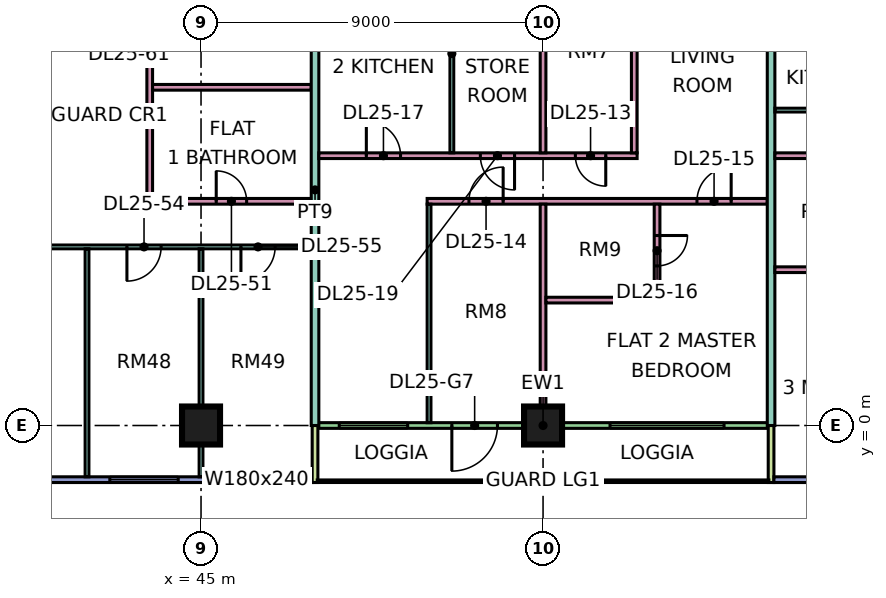
"""IFC4 building model, lengths in metres.
Left out: names, types, materials, properties, quantities, classifications, styles, units other than length and angle.
Written with IfcOpenShell. Run it as: python <this file> out.ifc"""

import sys

from ifc_helpers import new_model, si_unit, direction, frame, frame_2d, origin, origin_2d, place, context, subcontext, project, spatial, rectangle, extrude, element, fill, save


model = new_model("IFC4")
c1 = context("Model", 3, precision=1e-05, world=origin(), true_north=direction((0.0, 1.0)))
c2 = subcontext(c1, "Body", "Model", "MODEL_VIEW")
j1 = project(units=[si_unit("LENGTHUNIT", "METRE"), si_unit("PLANEANGLEUNIT", "RADIAN")], contexts=[c1])
p1 = place(None, origin())
s1 = spatial("IfcSite", under=j1, at=p1, CompositionType="ELEMENT")
p2 = place(p1, origin())
s2 = spatial("IfcBuilding", under=s1, at=p2, CompositionType="ELEMENT")
p3 = place(p2, frame((0.0, 0.0, 110.65)))
s3 = spatial("IfcBuildingStorey", under=s2, at=p3, CompositionType="ELEMENT", Elevation=110.65)
for number, where, z_axis, x_axis in (
    (1, (45.0, 0.0, 0.0), (0.0, 0.0, 1.0), (1.0, 0.0, 0.0)),
    (2, (54.0, 0.0, 0.0), (0.0, 0.0, 1.0), (1.0, 0.0, 0.0)),
):
    element("IfcColumn", number, at=place(p3, frame(where, z_axis=z_axis, x_axis=x_axis)), inside=s3, PredefinedType="COLUMN", context=c2, shape_type="SweptSolid", body=[
        extrude(rectangle(XDim=1.0, YDim=1.0, at=origin_2d()), origin(), (0.0, 0.0, 1.0), 3.75),
    ])
p4 = place(p3, frame((36.075, -1.425, 0.0), z_axis=(0.0, 0.0, 1.0), x_axis=(1.0, 0.0, 0.0)))
e3 = element("IfcWall", 3, at=p4, inside=s3, PredefinedType="SOLIDWALL", context=c2, shape_type="SweptSolid", body=[
    extrude(rectangle(XDim=11.85, YDim=0.15, at=frame_2d((5.925, 0.0))), origin(), (0.0, 0.0, 1.0), 3.35),
])
p5 = place(p4, frame((1.462, 0.0, 0.45)))
e4 = element("IfcOpeningElement", 4, at=p5, cuts=e3, PredefinedType="OPENING", context=c2, shape_type="SweptSolid", body=[
    extrude(rectangle(XDim=3.0, YDim=2.4, at=frame_2d((1.5, 1.2))), frame((0.0, 0.085, 0.0), z_axis=(0.0, -1.0, 0.0), x_axis=(1.0, 0.0, 0.0)), (0.0, 0.0, 1.0), 0.17),
])
p6 = place(p4, frame((6.525, 0.0, 0.45)))
e5 = element("IfcOpeningElement", 5, at=p6, cuts=e3, PredefinedType="OPENING", context=c2, shape_type="SweptSolid", body=[
    extrude(rectangle(XDim=1.8, YDim=2.4, at=frame_2d((0.9, 1.2))), frame((0.0, 0.085, 0.0), z_axis=(0.0, -1.0, 0.0), x_axis=(1.0, 0.0, 0.0)), (0.0, 0.0, 1.0), 0.17),
])
p7 = place(p4, frame((9.488, 0.0, 0.45)))
e6 = element("IfcOpeningElement", 6, at=p7, cuts=e3, PredefinedType="OPENING", context=c2, shape_type="SweptSolid", body=[
    extrude(rectangle(XDim=1.8, YDim=2.4, at=frame_2d((0.9, 1.2))), frame((0.0, 0.085, 0.0), z_axis=(0.0, -1.0, 0.0), x_axis=(1.0, 0.0, 0.0)), (0.0, 0.0, 1.0), 0.17),
])
p8 = place(p3, frame((48.075, 0.0, 0.0), z_axis=(0.0, 0.0, 1.0), x_axis=(1.0, 0.0, 0.0)))
e7 = element("IfcWall", 7, at=p8, inside=s3, PredefinedType="SOLIDWALL", context=c2, shape_type="SweptSolid", body=[
    extrude(rectangle(XDim=11.85, YDim=0.15, at=frame_2d((5.925, 0.0))), origin(), (0.0, 0.0, 1.0), 3.35),
])
p9 = place(p8, frame((0.562, 0.0, 0.45)))
e8 = element("IfcOpeningElement", 8, at=p9, cuts=e7, PredefinedType="OPENING", context=c2, shape_type="SweptSolid", body=[
    extrude(rectangle(XDim=1.8, YDim=2.4, at=frame_2d((0.9, 1.2))), frame((0.0, 0.085, 0.0), z_axis=(0.0, -1.0, 0.0), x_axis=(1.0, 0.0, 0.0)), (0.0, 0.0, 1.0), 0.17),
])
p10 = place(p8, frame((3.525, 0.0, 0.0)))
e9 = element("IfcOpeningElement", 9, at=p10, cuts=e7, PredefinedType="OPENING", context=c2, shape_type="SweptSolid", body=[
    extrude(rectangle(XDim=1.2, YDim=2.4, at=frame_2d((0.6, 1.2))), frame((0.0, 0.085, 0.0), z_axis=(0.0, -1.0, 0.0), x_axis=(1.0, 0.0, 0.0)), (0.0, 0.0, 1.0), 0.17),
])
p11 = place(p8, frame((7.688, 0.0, 0.45)))
e10 = element("IfcOpeningElement", 10, at=p11, cuts=e7, PredefinedType="OPENING", context=c2, shape_type="SweptSolid", body=[
    extrude(rectangle(XDim=3.0, YDim=2.4, at=frame_2d((1.5, 1.2))), frame((0.0, 0.085, 0.0), z_axis=(0.0, -1.0, 0.0), x_axis=(1.0, 0.0, 0.0)), (0.0, 0.0, 1.0), 0.17),
])
for number, where, z_axis, x_axis in (
    (11, (48.0, -1.5, 0.0), (0.0, 0.0, 1.0), (0.0, 1.0, 0.0)),
    (12, (60.0, -1.5, 0.0), (0.0, 0.0, 1.0), (0.0, 1.0, 0.0)),
):
    element("IfcWall", number, at=place(p3, frame(where, z_axis=z_axis, x_axis=x_axis)), inside=s3, PredefinedType="SOLIDWALL", context=c2, shape_type="SweptSolid", body=[
        extrude(rectangle(XDim=1.5, YDim=0.15, at=frame_2d((0.75, 0.0))), origin(), (0.0, 0.0, 1.0), 3.35),
    ])
p12 = place(p3, frame((60.075, -1.425, 0.0), z_axis=(0.0, 0.0, 1.0), x_axis=(1.0, 0.0, 0.0)))
e13 = element("IfcWall", 13, at=p12, inside=s3, PredefinedType="SOLIDWALL", context=c2, shape_type="SweptSolid", body=[
    extrude(rectangle(XDim=10.425, YDim=0.15, at=frame_2d((5.212, 0.0))), origin(), (0.0, 0.0, 1.0), 3.35),
])
p13 = place(p12, frame((1.462, 0.0, 0.45)))
e14 = element("IfcOpeningElement", 14, at=p13, cuts=e13, PredefinedType="OPENING", context=c2, shape_type="SweptSolid", body=[
    extrude(rectangle(XDim=3.0, YDim=2.4, at=frame_2d((1.5, 1.2))), frame((0.0, 0.085, 0.0), z_axis=(0.0, -1.0, 0.0), x_axis=(1.0, 0.0, 0.0)), (0.0, 0.0, 1.0), 0.17),
])
p14 = place(p12, frame((6.675, 0.0, 0.45)))
e15 = element("IfcOpeningElement", 15, at=p14, cuts=e13, PredefinedType="OPENING", context=c2, shape_type="SweptSolid", body=[
    extrude(rectangle(XDim=3.0, YDim=2.4, at=frame_2d((1.5, 1.2))), frame((0.0, 0.085, 0.0), z_axis=(0.0, -1.0, 0.0), x_axis=(1.0, 0.0, 0.0)), (0.0, 0.0, 1.0), 0.17),
])
p15 = place(p3, frame((33.05, 4.7, 0.0), z_axis=(0.0, 0.0, 1.0), x_axis=(1.0, 0.0, 0.0)))
e16 = element("IfcWall", 16, at=p15, inside=s3, PredefinedType="PARTITIONING", context=c2, shape_type="SweptSolid", body=[
    extrude(rectangle(XDim=14.85, YDim=0.1, at=frame_2d((7.425, 0.0))), origin(), (0.0, 0.0, 1.0), 3.35),
])
p16 = place(p15, frame((10.0, 0.0, 0.0)))
e17 = element("IfcOpeningElement", 17, at=p16, cuts=e16, PredefinedType="OPENING", context=c2, shape_type="SweptSolid", body=[
    extrude(rectangle(XDim=0.9, YDim=2.1, at=frame_2d((0.45, 1.05))), frame((0.0, 0.06, 0.0), z_axis=(0.0, -1.0, 0.0), x_axis=(1.0, 0.0, 0.0)), (0.0, 0.0, 1.0), 0.12),
])
p17 = place(p15, frame((13.0, 0.0, 0.0)))
e18 = element("IfcOpeningElement", 18, at=p17, cuts=e16, PredefinedType="OPENING", context=c2, shape_type="SweptSolid", body=[
    extrude(rectangle(XDim=0.9, YDim=2.1, at=frame_2d((0.45, 1.05))), frame((0.0, 0.06, 0.0), z_axis=(0.0, -1.0, 0.0), x_axis=(1.0, 0.0, 0.0)), (0.0, 0.0, 1.0), 0.12),
])
p18 = place(p15, frame((4.0, 0.0, 0.0)))
e19 = element("IfcOpeningElement", 19, at=p18, cuts=e16, PredefinedType="OPENING", context=c2, shape_type="SweptSolid", body=[
    extrude(rectangle(XDim=0.9, YDim=2.1, at=frame_2d((0.45, 1.05))), frame((0.0, 0.06, 0.0), z_axis=(0.0, -1.0, 0.0), x_axis=(1.0, 0.0, 0.0)), (0.0, 0.0, 1.0), 0.12),
])
p19 = place(p3, frame((42.0, -1.35, 0.0), z_axis=(0.0, 0.0, 1.0), x_axis=(0.0, 1.0, 0.0)))
e20 = element("IfcWall", 20, at=p19, inside=s3, PredefinedType="PARTITIONING", context=c2, shape_type="SweptSolid", body=[
    extrude(rectangle(XDim=6.0, YDim=0.1, at=frame_2d((3.0, 0.0))), origin(), (0.0, 0.0, 1.0), 3.35),
])
p20 = place(p3, frame((43.65, 5.825, 0.0), z_axis=(0.0, 0.0, 1.0), x_axis=(0.0, 1.0, 0.0)))
e21 = element("IfcWall", 21, at=p20, inside=s3, PredefinedType="PARTITIONING", context=c2, shape_type="SweptSolid", body=[
    extrude(rectangle(XDim=6.575, YDim=0.15, at=frame_2d((3.288, 0.0))), origin(), (0.0, 0.0, 1.0), 3.35),
])
p21 = place(p20, frame((4.425, 0.0, 0.0)))
e22 = element("IfcOpeningElement", 22, at=p21, cuts=e21, PredefinedType="OPENING", context=c2, shape_type="SweptSolid", body=[
    extrude(rectangle(XDim=0.9, YDim=2.1, at=frame_2d((0.45, 1.05))), frame((0.0, 0.085, 0.0), z_axis=(0.0, -1.0, 0.0), x_axis=(1.0, 0.0, 0.0)), (0.0, 0.0, 1.0), 0.17),
])
p22 = place(p3, frame((43.725, 5.9, 0.0), z_axis=(0.0, 0.0, 1.0), x_axis=(1.0, 0.0, 0.0)))
e23 = element("IfcWall", 23, at=p22, inside=s3, PredefinedType="PARTITIONING", context=c2, shape_type="SweptSolid", body=[
    extrude(rectangle(XDim=4.175, YDim=0.15, at=frame_2d((2.087, 0.0))), origin(), (0.0, 0.0, 1.0), 3.35),
])
p23 = place(p22, frame((1.675, 0.0, 0.0)))
e24 = element("IfcOpeningElement", 24, at=p23, cuts=e23, PredefinedType="OPENING", context=c2, shape_type="SweptSolid", body=[
    extrude(rectangle(XDim=0.8, YDim=2.1, at=frame_2d((0.4, 1.05))), frame((0.0, 0.085, 0.0), z_axis=(0.0, -1.0, 0.0), x_axis=(1.0, 0.0, 0.0)), (0.0, 0.0, 1.0), 0.17),
])
p24 = place(p3, frame((43.725, 8.9, 0.0), z_axis=(0.0, 0.0, 1.0), x_axis=(1.0, 0.0, 0.0)))
e25 = element("IfcWall", 25, at=p24, inside=s3, PredefinedType="PARTITIONING", context=c2, shape_type="SweptSolid", body=[
    extrude(rectangle(XDim=4.175, YDim=0.15, at=frame_2d((2.087, 0.0))), origin(), (0.0, 0.0, 1.0), 3.35),
])
p25 = place(p3, frame((45.0, -1.351, 0.0), z_axis=(0.0, 0.0, 1.0), x_axis=(0.0, 1.0, 0.0)))
e26 = element("IfcWall", 26, at=p25, inside=s3, PredefinedType="PARTITIONING", context=c2, shape_type="SweptSolid", body=[
    extrude(rectangle(XDim=6.001, YDim=0.1, at=frame_2d((3.0, 0.0))), origin(), (0.0, 0.0, 1.0), 3.35),
])
p26 = place(p3, frame((48.0, 0.0, 0.0), z_axis=(0.0, 0.0, 1.0), x_axis=(0.0, 1.0, 0.0)))
e27 = element("IfcWall", 27, at=p26, inside=s3, PredefinedType="PARTITIONING", context=c2, shape_type="SweptSolid", body=[
    extrude(rectangle(XDim=12.4, YDim=0.2, at=frame_2d((6.2, 0.0))), origin(), (0.0, 0.0, 1.0), 3.35),
])
p27 = place(p3, frame((48.1, 7.1, 0.0), z_axis=(0.0, 0.0, 1.0), x_axis=(1.0, 0.0, 0.0)))
e28 = element("IfcWall", 28, at=p27, inside=s3, PredefinedType="PARTITIONING", context=c2, shape_type="SweptSolid", body=[
    extrude(rectangle(XDim=8.375, YDim=0.15, at=frame_2d((4.188, 0.0))), origin(), (0.0, 0.0, 1.0), 3.35),
])
p28 = place(p27, frame((6.75, 0.0, 0.0)))
e29 = element("IfcOpeningElement", 29, at=p28, cuts=e28, PredefinedType="OPENING", context=c2, shape_type="SweptSolid", body=[
    extrude(rectangle(XDim=0.8, YDim=2.1, at=frame_2d((0.4, 1.05))), frame((0.0, 0.085, 0.0), z_axis=(0.0, -1.0, 0.0), x_axis=(1.0, 0.0, 0.0)), (0.0, 0.0, 1.0), 0.17),
])
p29 = place(p27, frame((1.25, 0.0, 0.0)))
e30 = element("IfcOpeningElement", 30, at=p29, cuts=e28, PredefinedType="OPENING", context=c2, shape_type="SweptSolid", body=[
    extrude(rectangle(XDim=0.9, YDim=2.1, at=frame_2d((0.45, 1.05))), frame((0.0, 0.085, 0.0), z_axis=(0.0, -1.0, 0.0), x_axis=(1.0, 0.0, 0.0)), (0.0, 0.0, 1.0), 0.17),
])
p30 = place(p27, frame((4.25, 0.0, 0.0)))
e31 = element("IfcOpeningElement", 31, at=p30, cuts=e28, PredefinedType="OPENING", context=c2, shape_type="SweptSolid", body=[
    extrude(rectangle(XDim=0.9, YDim=2.1, at=frame_2d((0.45, 1.05))), frame((0.0, 0.085, 0.0), z_axis=(0.0, -1.0, 0.0), x_axis=(1.0, 0.0, 0.0)), (0.0, 0.0, 1.0), 0.17),
])
p31 = place(p3, frame((50.95, 5.9, 0.0), z_axis=(0.0, 0.0, 1.0), x_axis=(1.0, 0.0, 0.0)))
e32 = element("IfcWall", 32, at=p31, inside=s3, PredefinedType="PARTITIONING", context=c2, shape_type="SweptSolid", body=[
    extrude(rectangle(XDim=8.95, YDim=0.15, at=frame_2d((4.475, 0.0))), origin(), (0.0, 0.0, 1.0), 3.35),
])
p32 = place(p31, frame((1.1, 0.0, 0.0)))
e33 = element("IfcOpeningElement", 33, at=p32, cuts=e32, PredefinedType="OPENING", context=c2, shape_type="SweptSolid", body=[
    extrude(rectangle(XDim=0.9, YDim=2.1, at=frame_2d((0.45, 1.05))), frame((0.0, 0.085, 0.0), z_axis=(0.0, -1.0, 0.0), x_axis=(1.0, 0.0, 0.0)), (0.0, 0.0, 1.0), 0.17),
])
p33 = place(p31, frame((7.1, 0.0, 0.0)))
e34 = element("IfcOpeningElement", 34, at=p33, cuts=e32, PredefinedType="OPENING", context=c2, shape_type="SweptSolid", body=[
    extrude(rectangle(XDim=0.9, YDim=2.1, at=frame_2d((0.45, 1.05))), frame((0.0, 0.085, 0.0), z_axis=(0.0, -1.0, 0.0), x_axis=(1.0, 0.0, 0.0)), (0.0, 0.0, 1.0), 0.17),
])
p34 = place(p3, frame((51.0, 0.074, 0.0), z_axis=(0.0, 0.0, 1.0), x_axis=(0.0, 1.0, 0.0)))
e35 = element("IfcWall", 35, at=p34, inside=s3, PredefinedType="PARTITIONING", context=c2, shape_type="SweptSolid", body=[
    extrude(rectangle(XDim=5.751, YDim=0.1, at=frame_2d((2.875, 0.0))), origin(), (0.0, 0.0, 1.0), 3.35),
])
p35 = place(p3, frame((51.6, 7.175, 0.0), z_axis=(0.0, 0.0, 1.0), x_axis=(0.0, 1.0, 0.0)))
e36 = element("IfcWall", 36, at=p35, inside=s3, PredefinedType="PARTITIONING", context=c2, shape_type="SweptSolid", body=[
    extrude(rectangle(XDim=5.225, YDim=0.1, at=frame_2d((2.612, 0.0))), origin(), (0.0, 0.0, 1.0), 3.35),
])
p36 = place(p3, frame((54.0, 0.074, 0.0), z_axis=(0.0, 0.0, 1.0), x_axis=(0.0, 1.0, 0.0)))
e37 = element("IfcWall", 37, at=p36, inside=s3, PredefinedType="PARTITIONING", context=c2, shape_type="SweptSolid", body=[
    extrude(rectangle(XDim=5.751, YDim=0.15, at=frame_2d((2.875, 0.0))), origin(), (0.0, 0.0, 1.0), 3.35),
])
p37 = place(p3, frame((54.0, 7.175, 0.0), z_axis=(0.0, 0.0, 1.0), x_axis=(0.0, 1.0, 0.0)))
e38 = element("IfcWall", 38, at=p37, inside=s3, PredefinedType="PARTITIONING", context=c2, shape_type="SweptSolid", body=[
    extrude(rectangle(XDim=5.225, YDim=0.15, at=frame_2d((2.612, 0.0))), origin(), (0.0, 0.0, 1.0), 3.35),
])
p38 = place(p3, frame((54.075, 3.3, 0.0), z_axis=(0.0, 0.0, 1.0), x_axis=(1.0, 0.0, 0.0)))
e39 = element("IfcWall", 39, at=p38, inside=s3, PredefinedType="PARTITIONING", context=c2, shape_type="SweptSolid", body=[
    extrude(rectangle(XDim=3.0, YDim=0.15, at=frame_2d((1.5, 0.0))), origin(), (0.0, 0.0, 1.0), 3.35),
])
p39 = place(p3, frame((56.4, 7.175, 0.0), z_axis=(0.0, 0.0, 1.0), x_axis=(0.0, 1.0, 0.0)))
e40 = element("IfcWall", 40, at=p39, inside=s3, PredefinedType="PARTITIONING", context=c2, shape_type="SweptSolid", body=[
    extrude(rectangle(XDim=5.225, YDim=0.15, at=frame_2d((2.612, 0.0))), origin(), (0.0, 0.0, 1.0), 3.35),
])
p40 = place(p3, frame((57.0, 3.375, 0.0), z_axis=(0.0, 0.0, 1.0), x_axis=(0.0, 1.0, 0.0)))
e41 = element("IfcWall", 41, at=p40, inside=s3, PredefinedType="PARTITIONING", context=c2, shape_type="SweptSolid", body=[
    extrude(rectangle(XDim=2.45, YDim=0.15, at=frame_2d((1.225, 0.0))), origin(), (0.0, 0.0, 1.0), 3.35),
])
p41 = place(p40, frame((0.825, 0.0, 0.0)))
e42 = element("IfcOpeningElement", 42, at=p41, cuts=e41, PredefinedType="OPENING", context=c2, shape_type="SweptSolid", body=[
    extrude(rectangle(XDim=0.8, YDim=2.1, at=frame_2d((0.4, 1.05))), frame((0.0, 0.085, 0.0), z_axis=(0.0, -1.0, 0.0), x_axis=(1.0, 0.0, 0.0)), (0.0, 0.0, 1.0), 0.17),
])
p42 = place(p3, frame((60.0, 0.0, 0.0), z_axis=(0.0, 0.0, 1.0), x_axis=(0.0, 1.0, 0.0)))
e43 = element("IfcWall", 43, at=p42, inside=s3, PredefinedType="PARTITIONING", context=c2, shape_type="SweptSolid", body=[
    extrude(rectangle(XDim=12.4, YDim=0.2, at=frame_2d((6.2, 0.0))), origin(), (0.0, 0.0, 1.0), 3.35),
])
p43 = place(p3, frame((60.1, 4.1, 0.0), z_axis=(0.0, 0.0, 1.0), x_axis=(1.0, 0.0, 0.0)))
e44 = element("IfcWall", 44, at=p43, inside=s3, PredefinedType="PARTITIONING", context=c2, shape_type="SweptSolid", body=[
    extrude(rectangle(XDim=2.825, YDim=0.15, at=frame_2d((1.413, 0.0))), origin(), (0.0, 0.0, 1.0), 3.35),
])
p44 = place(p3, frame((60.1, 7.1, 0.0), z_axis=(0.0, 0.0, 1.0), x_axis=(1.0, 0.0, 0.0)))
e45 = element("IfcWall", 45, at=p44, inside=s3, PredefinedType="PARTITIONING", context=c2, shape_type="SweptSolid", body=[
    extrude(rectangle(XDim=5.95, YDim=0.15, at=frame_2d((2.975, 0.0))), origin(), (0.0, 0.0, 1.0), 3.35),
])
p45 = place(p44, frame((3.95, 0.0, 0.0)))
e46 = element("IfcOpeningElement", 46, at=p45, cuts=e45, PredefinedType="OPENING", context=c2, shape_type="SweptSolid", body=[
    extrude(rectangle(XDim=0.9, YDim=2.1, at=frame_2d((0.45, 1.05))), frame((0.0, 0.085, 0.0), z_axis=(0.0, -1.0, 0.0), x_axis=(1.0, 0.0, 0.0)), (0.0, 0.0, 1.0), 0.17),
])
p46 = place(p3, frame((60.1, 8.3, 0.0), z_axis=(0.0, 0.0, 1.0), x_axis=(1.0, 0.0, 0.0)))
e47 = element("IfcWall", 47, at=p46, inside=s3, PredefinedType="PARTITIONING", context=c2, shape_type="SweptSolid", body=[
    extrude(rectangle(XDim=2.85, YDim=0.1, at=frame_2d((1.425, 0.0))), origin(), (0.0, 0.0, 1.0), 3.35),
])
p47 = place(p6, origin())
e48 = element("IfcWindow", 48, at=p47, inside=s3, PartitioningType="SINGLE_PANEL", PredefinedType="WINDOW", context=c2, shape_type="SweptSolid", body=[
    extrude(rectangle(XDim=1.8, YDim=2.4, at=frame_2d((0.9, 1.2))), frame((0.0, 0.03, 0.0), z_axis=(0.0, -1.0, 0.0), x_axis=(1.0, 0.0, 0.0)), (0.0, 0.0, 1.0), 0.06),
])
fill(e5, e48)
p48 = place(p7, origin())
e49 = element("IfcWindow", 49, at=p48, inside=s3, PartitioningType="SINGLE_PANEL", PredefinedType="WINDOW", context=c2, shape_type="SweptSolid", body=[
    extrude(rectangle(XDim=1.8, YDim=2.4, at=frame_2d((0.9, 1.2))), frame((0.0, 0.03, 0.0), z_axis=(0.0, -1.0, 0.0), x_axis=(1.0, 0.0, 0.0)), (0.0, 0.0, 1.0), 0.06),
])
fill(e6, e49)
p49 = place(p9, origin())
e50 = element("IfcWindow", 50, at=p49, inside=s3, PartitioningType="SINGLE_PANEL", PredefinedType="WINDOW", context=c2, shape_type="SweptSolid", body=[
    extrude(rectangle(XDim=1.8, YDim=2.4, at=frame_2d((0.9, 1.2))), frame((0.0, 0.03, 0.0), z_axis=(0.0, -1.0, 0.0), x_axis=(1.0, 0.0, 0.0)), (0.0, 0.0, 1.0), 0.06),
])
fill(e8, e50)
p50 = place(p10, frame((1.2, 0.0, 0.0), z_axis=(0.0, 0.0, 1.0), x_axis=(-1.0, 0.0, 0.0)))
e51 = element("IfcDoor", 51, at=p50, inside=s3, OperationType="DOUBLE_DOOR_SINGLE_SWING", PredefinedType="DOOR", context=c2, shape_type="SweptSolid", body=[
    extrude(rectangle(XDim=1.2, YDim=2.4, at=frame_2d((0.6, 1.2))), frame((0.0, 0.025, 0.0), z_axis=(0.0, -1.0, 0.0), x_axis=(1.0, 0.0, 0.0)), (0.0, 0.0, 1.0), 0.05),
])
fill(e9, e51)
p51 = place(p11, origin())
e52 = element("IfcWindow", 52, at=p51, inside=s3, PartitioningType="SINGLE_PANEL", PredefinedType="WINDOW", context=c2, shape_type="SweptSolid", body=[
    extrude(rectangle(XDim=3.0, YDim=2.4, at=frame_2d((1.5, 1.2))), frame((0.0, 0.03, 0.0), z_axis=(0.0, -1.0, 0.0), x_axis=(1.0, 0.0, 0.0)), (0.0, 0.0, 1.0), 0.06),
])
fill(e10, e52)
p52 = place(p28, origin())
e53 = element("IfcDoor", 53, at=p52, inside=s3, OperationType="SINGLE_SWING_RIGHT", PredefinedType="DOOR", context=c2, shape_type="SweptSolid", body=[
    extrude(rectangle(XDim=0.8, YDim=2.1, at=frame_2d((0.4, 1.05))), frame((0.0, 0.025, 0.0), z_axis=(0.0, -1.0, 0.0), x_axis=(1.0, 0.0, 0.0)), (0.0, 0.0, 1.0), 0.05),
])
fill(e29, e53)
p53 = place(p32, frame((0.9, 0.0, 0.0), z_axis=(0.0, 0.0, 1.0), x_axis=(-1.0, 0.0, 0.0)))
e54 = element("IfcDoor", 54, at=p53, inside=s3, OperationType="SINGLE_SWING_RIGHT", PredefinedType="DOOR", context=c2, shape_type="SweptSolid", body=[
    extrude(rectangle(XDim=0.9, YDim=2.1, at=frame_2d((0.45, 1.05))), frame((0.0, 0.025, 0.0), z_axis=(0.0, -1.0, 0.0), x_axis=(1.0, 0.0, 0.0)), (0.0, 0.0, 1.0), 0.05),
])
fill(e33, e54)
p54 = place(p33, frame((0.9, 0.0, 0.0), z_axis=(0.0, 0.0, 1.0), x_axis=(-1.0, 0.0, 0.0)))
e55 = element("IfcDoor", 55, at=p54, inside=s3, OperationType="SINGLE_SWING_RIGHT", PredefinedType="DOOR", context=c2, shape_type="SweptSolid", body=[
    extrude(rectangle(XDim=0.9, YDim=2.1, at=frame_2d((0.45, 1.05))), frame((0.0, 0.025, 0.0), z_axis=(0.0, -1.0, 0.0), x_axis=(1.0, 0.0, 0.0)), (0.0, 0.0, 1.0), 0.05),
])
fill(e34, e55)
p55 = place(p41, origin())
e56 = element("IfcDoor", 56, at=p55, inside=s3, OperationType="SINGLE_SWING_RIGHT", PredefinedType="DOOR", context=c2, shape_type="SweptSolid", body=[
    extrude(rectangle(XDim=0.8, YDim=2.1, at=frame_2d((0.4, 1.05))), frame((0.0, 0.025, 0.0), z_axis=(0.0, -1.0, 0.0), x_axis=(1.0, 0.0, 0.0)), (0.0, 0.0, 1.0), 0.05),
])
fill(e42, e56)
p56 = place(p29, origin())
e57 = element("IfcDoor", 57, at=p56, inside=s3, OperationType="SINGLE_SWING_LEFT", PredefinedType="DOOR", context=c2, shape_type="SweptSolid", body=[
    extrude(rectangle(XDim=0.9, YDim=2.1, at=frame_2d((0.45, 1.05))), frame((0.0, 0.025, 0.0), z_axis=(0.0, -1.0, 0.0), x_axis=(1.0, 0.0, 0.0)), (0.0, 0.0, 1.0), 0.05),
])
fill(e30, e57)
p57 = place(p30, origin())
e58 = element("IfcDoor", 58, at=p57, inside=s3, OperationType="SINGLE_SWING_RIGHT", PredefinedType="DOOR", context=c2, shape_type="SweptSolid", body=[
    extrude(rectangle(XDim=0.9, YDim=2.1, at=frame_2d((0.45, 1.05))), frame((0.0, 0.025, 0.0), z_axis=(0.0, -1.0, 0.0), x_axis=(1.0, 0.0, 0.0)), (0.0, 0.0, 1.0), 0.05),
])
fill(e31, e58)
p58 = place(p23, origin())
e59 = element("IfcDoor", 59, at=p58, inside=s3, OperationType="SINGLE_SWING_LEFT", PredefinedType="DOOR", context=c2, shape_type="SweptSolid", body=[
    extrude(rectangle(XDim=0.8, YDim=2.1, at=frame_2d((0.4, 1.05))), frame((0.0, 0.025, 0.0), z_axis=(0.0, -1.0, 0.0), x_axis=(1.0, 0.0, 0.0)), (0.0, 0.0, 1.0), 0.05),
])
fill(e24, e59)
p59 = place(p16, frame((0.9, 0.0, 0.0), z_axis=(0.0, 0.0, 1.0), x_axis=(-1.0, 0.0, 0.0)))
e60 = element("IfcDoor", 60, at=p59, inside=s3, OperationType="SINGLE_SWING_LEFT", PredefinedType="DOOR", context=c2, shape_type="SweptSolid", body=[
    extrude(rectangle(XDim=0.9, YDim=2.1, at=frame_2d((0.45, 1.05))), frame((0.0, 0.025, 0.0), z_axis=(0.0, -1.0, 0.0), x_axis=(1.0, 0.0, 0.0)), (0.0, 0.0, 1.0), 0.05),
])
fill(e17, e60)
p60 = place(p17, frame((0.9, 0.0, 0.0), z_axis=(0.0, 0.0, 1.0), x_axis=(-1.0, 0.0, 0.0)))
e61 = element("IfcDoor", 61, at=p60, inside=s3, OperationType="SINGLE_SWING_LEFT", PredefinedType="DOOR", context=c2, shape_type="SweptSolid", body=[
    extrude(rectangle(XDim=0.9, YDim=2.1, at=frame_2d((0.45, 1.05))), frame((0.0, 0.025, 0.0), z_axis=(0.0, -1.0, 0.0), x_axis=(1.0, 0.0, 0.0)), (0.0, 0.0, 1.0), 0.05),
])
fill(e18, e61)
save(model, sys.argv[1])
